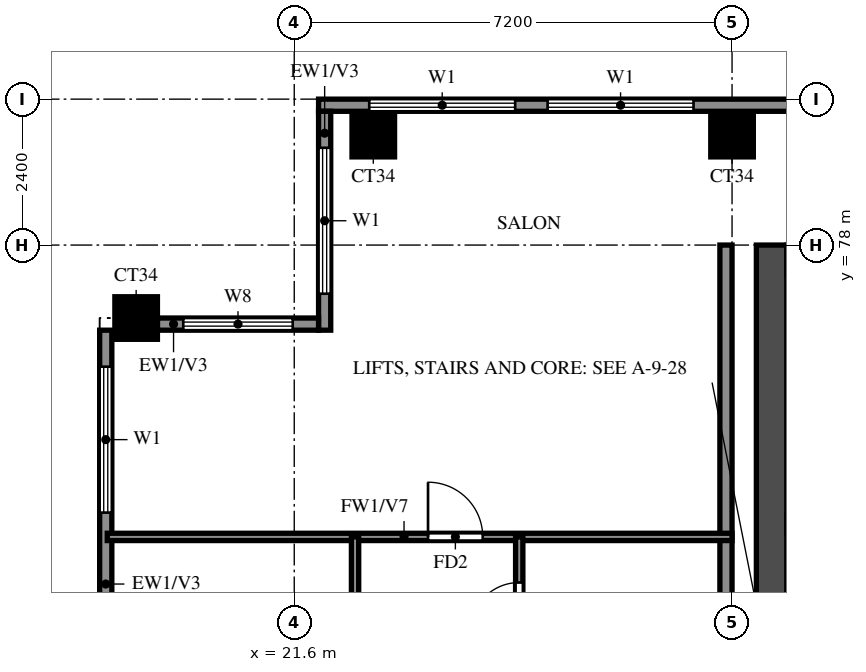
"""IFC4 building model, lengths in metres.
Left out: names, types, materials, properties, quantities, classifications, styles, units other than length and angle.
Written with IfcOpenShell. Run it as: python <this file> out.ifc"""

import sys

from ifc_helpers import new_model, si_unit, direction, frame, frame_2d, origin, origin_2d, place, context, subcontext, project, spatial, rectangle, extrude, source, transform, mapped, element, fill, save


model = new_model("IFC4")
c1 = context("Model", 3, precision=1e-05, world=origin(), true_north=direction((0.0, 1.0)))
c2 = subcontext(c1, "Body", "Model", "MODEL_VIEW")
j1 = project(units=[si_unit("LENGTHUNIT", "METRE"), si_unit("PLANEANGLEUNIT", "RADIAN")], contexts=[c1])
p1 = place(None, origin())
s1 = spatial("IfcSite", under=j1, at=p1, CompositionType="ELEMENT")
p2 = place(p1, origin())
s2 = spatial("IfcBuilding", under=s1, at=p2, CompositionType="ELEMENT")
p3 = place(p2, frame((0.0, 0.0, 215.0)))
s3 = spatial("IfcBuildingStorey", under=s2, at=p3, CompositionType="ELEMENT", Elevation=215.0)
m1 = source(origin(), c2, "Body", "SweptSolid", [
    extrude(rectangle(XDim=0.7, YDim=0.7, at=origin_2d()), origin(), (0.0, 0.0, 1.0), 3.22),
])
for number, where, z_axis, x_axis in (
    (1, (19.0, 76.8, 0.0), (0.0, 0.0, 1.0), (1.0, 0.0, 0.0)),
    (2, (22.9, 79.8, 0.0), (0.0, 0.0, 1.0), (1.0, 0.0, 0.0)),
    (3, (28.8, 79.8, 0.0), (0.0, 0.0, 1.0), (1.0, 0.0, 0.0)),
):
    element("IfcColumn", number, at=place(p3, frame(where, z_axis=z_axis, x_axis=x_axis)), inside=s3, PredefinedType="COLUMN", context=c2, shape_type="MappedRepresentation", body=[
        mapped(m1, transform((0.0, 0.0, 0.0))),
    ])
p4 = place(p3, frame((29.45, 66.15, 0.0), z_axis=(0.0, 0.0, 1.0), x_axis=(0.0, 1.0, 0.0)))
e4 = element("IfcWall", 4, at=p4, inside=s3, PredefinedType="SHEAR", context=c2, shape_type="SweptSolid", body=[
    extrude(rectangle(XDim=11.85, YDim=0.5, at=frame_2d((5.925, 0.0))), origin(), (0.0, 0.0, 1.0), 3.22),
])
p5 = place(p3, frame((78.6, 80.3, 0.0), z_axis=(0.0, 0.0, 1.0), x_axis=(-1.0, 0.0, 0.0)))
e5 = element("IfcWall", 5, at=p5, inside=s3, PredefinedType="SOLIDWALL", context=c2, shape_type="SweptSolid", body=[
    extrude(rectangle(XDim=56.6, YDim=0.2, at=frame_2d((28.3, 0.0))), origin(), (0.0, 0.0, 1.0), 3.22),
])
p6 = place(p5, frame((3.9, 0.0, 0.0)))
e6 = element("IfcOpeningElement", 6, at=p6, cuts=e5, PredefinedType="OPENING", context=c2, shape_type="SweptSolid", body=[
    extrude(rectangle(XDim=1.8, YDim=2.4, at=frame_2d((0.9, 1.2))), frame((0.0, 0.11, 0.0), z_axis=(0.0, -1.0, 0.0), x_axis=(1.0, 0.0, 0.0)), (0.0, 0.0, 1.0), 0.22),
])
p7 = place(p5, frame((50.433, 0.0, 0.6)))
e7 = element("IfcOpeningElement", 7, at=p7, cuts=e5, PredefinedType="OPENING", context=c2, shape_type="SweptSolid", body=[
    extrude(rectangle(XDim=2.4, YDim=2.4, at=frame_2d((1.2, 1.2))), frame((0.0, 0.11, 0.0), z_axis=(0.0, -1.0, 0.0), x_axis=(1.0, 0.0, 0.0)), (0.0, 0.0, 1.0), 0.22),
])
p8 = place(p5, frame((53.367, 0.0, 0.6)))
e8 = element("IfcOpeningElement", 8, at=p8, cuts=e5, PredefinedType="OPENING", context=c2, shape_type="SweptSolid", body=[
    extrude(rectangle(XDim=2.4, YDim=2.4, at=frame_2d((1.2, 1.2))), frame((0.0, 0.11, 0.0), z_axis=(0.0, -1.0, 0.0), x_axis=(1.0, 0.0, 0.0)), (0.0, 0.0, 1.0), 0.22),
])
p9 = place(p5, frame((0.4, 0.0, 0.6)))
e9 = element("IfcOpeningElement", 9, at=p9, cuts=e5, PredefinedType="OPENING", context=c2, shape_type="SweptSolid", body=[
    extrude(rectangle(XDim=1.2, YDim=2.4, at=frame_2d((0.6, 1.2))), frame((0.0, 0.11, 0.0), z_axis=(0.0, -1.0, 0.0), x_axis=(1.0, 0.0, 0.0)), (0.0, 0.0, 1.0), 0.22),
])
p10 = place(p5, frame((2.55, 0.0, 0.6)))
e10 = element("IfcOpeningElement", 10, at=p10, cuts=e5, PredefinedType="OPENING", context=c2, shape_type="SweptSolid", body=[
    extrude(rectangle(XDim=0.9, YDim=2.4, at=frame_2d((0.45, 1.2))), frame((0.0, 0.11, 0.0), z_axis=(0.0, -1.0, 0.0), x_axis=(1.0, 0.0, 0.0)), (0.0, 0.0, 1.0), 0.22),
])
p11 = place(p3, frame((22.1, 80.2, 0.0), z_axis=(0.0, 0.0, 1.0), x_axis=(0.0, -1.0, 0.0)))
e11 = element("IfcWall", 11, at=p11, inside=s3, PredefinedType="SOLIDWALL", context=c2, shape_type="SweptSolid", body=[
    extrude(rectangle(XDim=3.6, YDim=0.2, at=frame_2d((1.8, 0.0))), origin(), (0.0, 0.0, 1.0), 3.22),
])
p12 = place(p11, frame((0.6, 0.0, 0.6)))
e12 = element("IfcOpeningElement", 12, at=p12, cuts=e11, PredefinedType="OPENING", context=c2, shape_type="SweptSolid", body=[
    extrude(rectangle(XDim=2.4, YDim=2.4, at=frame_2d((1.2, 1.2))), frame((0.0, 0.11, 0.0), z_axis=(0.0, -1.0, 0.0), x_axis=(1.0, 0.0, 0.0)), (0.0, 0.0, 1.0), 0.22),
])
p13 = place(p3, frame((22.0, 76.7, 0.0), z_axis=(0.0, 0.0, 1.0), x_axis=(-1.0, 0.0, 0.0)))
e13 = element("IfcWall", 13, at=p13, inside=s3, PredefinedType="SOLIDWALL", context=c2, shape_type="SweptSolid", body=[
    extrude(rectangle(XDim=2.65, YDim=0.2, at=frame_2d((1.325, 0.0))), origin(), (0.0, 0.0, 1.0), 3.22),
])
p14 = place(p13, frame((0.425, 0.0, 0.6)))
e14 = element("IfcOpeningElement", 14, at=p14, cuts=e13, PredefinedType="OPENING", context=c2, shape_type="SweptSolid", body=[
    extrude(rectangle(XDim=1.8, YDim=2.4, at=frame_2d((0.9, 1.2))), frame((0.0, 0.11, 0.0), z_axis=(0.0, -1.0, 0.0), x_axis=(1.0, 0.0, 0.0)), (0.0, 0.0, 1.0), 0.22),
])
p15 = place(p3, frame((18.5, 76.6, 0.0), z_axis=(0.0, 0.0, 1.0), x_axis=(0.0, -1.0, 0.0)))
e15 = element("IfcWall", 15, at=p15, inside=s3, PredefinedType="SOLIDWALL", context=c2, shape_type="SweptSolid", body=[
    extrude(rectangle(XDim=33.4, YDim=0.2, at=frame_2d((16.7, 0.0))), origin(), (0.0, 0.0, 1.0), 3.22),
])
p16 = place(p15, frame((29.7, 0.0, 0.6)))
e16 = element("IfcOpeningElement", 16, at=p16, cuts=e15, PredefinedType="OPENING", context=c2, shape_type="SweptSolid", body=[
    extrude(rectangle(XDim=2.4, YDim=2.4, at=frame_2d((1.2, 1.2))), frame((0.0, 0.11, 0.0), z_axis=(0.0, -1.0, 0.0), x_axis=(1.0, 0.0, 0.0)), (0.0, 0.0, 1.0), 0.22),
])
p17 = place(p15, frame((25.6, 0.0, 0.6)))
e17 = element("IfcOpeningElement", 17, at=p17, cuts=e15, PredefinedType="OPENING", context=c2, shape_type="SweptSolid", body=[
    extrude(rectangle(XDim=2.4, YDim=2.4, at=frame_2d((1.2, 1.2))), frame((0.0, 0.11, 0.0), z_axis=(0.0, -1.0, 0.0), x_axis=(1.0, 0.0, 0.0)), (0.0, 0.0, 1.0), 0.22),
])
p18 = place(p15, frame((22.0, 0.0, 0.6)))
e18 = element("IfcOpeningElement", 18, at=p18, cuts=e15, PredefinedType="OPENING", context=c2, shape_type="SweptSolid", body=[
    extrude(rectangle(XDim=2.4, YDim=2.4, at=frame_2d((1.2, 1.2))), frame((0.0, 0.11, 0.0), z_axis=(0.0, -1.0, 0.0), x_axis=(1.0, 0.0, 0.0)), (0.0, 0.0, 1.0), 0.22),
])
p19 = place(p15, frame((18.4, 0.0, 0.6)))
e19 = element("IfcOpeningElement", 19, at=p19, cuts=e15, PredefinedType="OPENING", context=c2, shape_type="SweptSolid", body=[
    extrude(rectangle(XDim=2.4, YDim=2.4, at=frame_2d((1.2, 1.2))), frame((0.0, 0.11, 0.0), z_axis=(0.0, -1.0, 0.0), x_axis=(1.0, 0.0, 0.0)), (0.0, 0.0, 1.0), 0.22),
])
p20 = place(p15, frame((14.8, 0.0, 0.6)))
e20 = element("IfcOpeningElement", 20, at=p20, cuts=e15, PredefinedType="OPENING", context=c2, shape_type="SweptSolid", body=[
    extrude(rectangle(XDim=2.4, YDim=2.4, at=frame_2d((1.2, 1.2))), frame((0.0, 0.11, 0.0), z_axis=(0.0, -1.0, 0.0), x_axis=(1.0, 0.0, 0.0)), (0.0, 0.0, 1.0), 0.22),
])
p21 = place(p15, frame((7.833, 0.0, 0.6)))
e21 = element("IfcOpeningElement", 21, at=p21, cuts=e15, PredefinedType="OPENING", context=c2, shape_type="SweptSolid", body=[
    extrude(rectangle(XDim=2.4, YDim=2.4, at=frame_2d((1.2, 1.2))), frame((0.0, 0.11, 0.0), z_axis=(0.0, -1.0, 0.0), x_axis=(1.0, 0.0, 0.0)), (0.0, 0.0, 1.0), 0.22),
])
p22 = place(p15, frame((10.967, 0.0, 0.6)))
e22 = element("IfcOpeningElement", 22, at=p22, cuts=e15, PredefinedType="OPENING", context=c2, shape_type="SweptSolid", body=[
    extrude(rectangle(XDim=2.4, YDim=2.4, at=frame_2d((1.2, 1.2))), frame((0.0, 0.11, 0.0), z_axis=(0.0, -1.0, 0.0), x_axis=(1.0, 0.0, 0.0)), (0.0, 0.0, 1.0), 0.22),
])
p23 = place(p15, frame((4.75, 0.0, 1.5)))
e23 = element("IfcOpeningElement", 23, at=p23, cuts=e15, PredefinedType="OPENING", context=c2, shape_type="SweptSolid", body=[
    extrude(rectangle(XDim=0.9, YDim=0.9, at=frame_2d((0.45, 0.45))), frame((0.0, 0.11, 0.0), z_axis=(0.0, -1.0, 0.0), x_axis=(1.0, 0.0, 0.0)), (0.0, 0.0, 1.0), 0.22),
])
p24 = place(p15, frame((0.6, 0.0, 0.6)))
e24 = element("IfcOpeningElement", 24, at=p24, cuts=e15, PredefinedType="OPENING", context=c2, shape_type="SweptSolid", body=[
    extrude(rectangle(XDim=2.4, YDim=2.4, at=frame_2d((1.2, 1.2))), frame((0.0, 0.11, 0.0), z_axis=(0.0, -1.0, 0.0), x_axis=(1.0, 0.0, 0.0)), (0.0, 0.0, 1.0), 0.22),
])
p25 = place(p3, frame((28.7, 62.4, 0.0), z_axis=(0.0, 0.0, 1.0), x_axis=(0.0, 1.0, 0.0)))
e25 = element("IfcWall", 25, at=p25, inside=s3, PredefinedType="SOLIDWALL", context=c2, shape_type="SweptSolid", body=[
    extrude(rectangle(XDim=15.6, YDim=0.2, at=frame_2d((7.8, 0.0))), origin(), (0.0, 0.0, 1.0), 3.22),
])
p26 = place(p3, frame((18.525, 73.2, 0.0), z_axis=(0.0, 0.0, 1.0), x_axis=(1.0, 0.0, 0.0)))
e26 = element("IfcWall", 26, at=p26, inside=s3, PredefinedType="PARTITIONING", context=c2, shape_type="SweptSolid", body=[
    extrude(rectangle(XDim=10.275, YDim=0.12, at=frame_2d((5.138, 0.0))), origin(), (0.0, 0.0, 1.0), 2.32),
])
p27 = place(p26, frame((5.275, 0.0, 0.0)))
e27 = element("IfcOpeningElement", 27, at=p27, cuts=e26, PredefinedType="OPENING", context=c2, shape_type="SweptSolid", body=[
    extrude(rectangle(XDim=0.9, YDim=2.1, at=frame_2d((0.45, 1.05))), frame((0.0, 0.07, 0.0), z_axis=(0.0, -1.0, 0.0), x_axis=(1.0, 0.0, 0.0)), (0.0, 0.0, 1.0), 0.14),
])
p28 = place(p3, frame((22.6, 69.6, 0.0), z_axis=(0.0, 0.0, 1.0), x_axis=(0.0, 1.0, 0.0)))
e28 = element("IfcWall", 28, at=p28, inside=s3, PredefinedType="PARTITIONING", context=c2, shape_type="SweptSolid", body=[
    extrude(rectangle(XDim=3.6, YDim=0.12, at=frame_2d((1.8, 0.0))), origin(), (0.0, 0.0, 1.0), 3.22),
])
p29 = place(p3, frame((25.3, 61.2, 0.0), z_axis=(0.0, 0.0, 1.0), x_axis=(0.0, 1.0, 0.0)))
e29 = element("IfcWall", 29, at=p29, inside=s3, PredefinedType="PARTITIONING", context=c2, shape_type="SweptSolid", body=[
    extrude(rectangle(XDim=12.0, YDim=0.12, at=frame_2d((6.0, 0.0))), origin(), (0.0, 0.0, 1.0), 3.22),
])
p30 = place(p29, frame((4.2, 0.0, 0.0)))
e30 = element("IfcOpeningElement", 30, at=p30, cuts=e29, PredefinedType="OPENING", context=c2, shape_type="SweptSolid", body=[
    extrude(rectangle(XDim=0.9, YDim=2.1, at=frame_2d((0.45, 1.05))), frame((0.0, 0.07, 0.0), z_axis=(0.0, -1.0, 0.0), x_axis=(1.0, 0.0, 0.0)), (0.0, 0.0, 1.0), 0.14),
])
p31 = place(p29, frame((7.975, 0.0, 0.0)))
e31 = element("IfcOpeningElement", 31, at=p31, cuts=e29, PredefinedType="OPENING", context=c2, shape_type="SweptSolid", body=[
    extrude(rectangle(XDim=0.8, YDim=2.1, at=frame_2d((0.4, 1.05))), frame((0.0, 0.07, 0.0), z_axis=(0.0, -1.0, 0.0), x_axis=(1.0, 0.0, 0.0)), (0.0, 0.0, 1.0), 0.14),
])
p32 = place(p29, frame((10.45, 0.0, 0.0)))
e32 = element("IfcOpeningElement", 32, at=p32, cuts=e29, PredefinedType="OPENING", context=c2, shape_type="SweptSolid", body=[
    extrude(rectangle(XDim=0.8, YDim=2.1, at=frame_2d((0.4, 1.05))), frame((0.0, 0.07, 0.0), z_axis=(0.0, -1.0, 0.0), x_axis=(1.0, 0.0, 0.0)), (0.0, 0.0, 1.0), 0.14),
])
p33 = place(p7, origin())
e33 = element("IfcWindow", 33, at=p33, inside=s3, PartitioningType="DOUBLE_PANEL_VERTICAL", PredefinedType="WINDOW", context=c2, shape_type="SweptSolid", body=[
    extrude(rectangle(XDim=2.4, YDim=2.4, at=frame_2d((1.2, 1.2))), frame((0.0, 0.03, 0.0), z_axis=(0.0, -1.0, 0.0), x_axis=(1.0, 0.0, 0.0)), (0.0, 0.0, 1.0), 0.06),
])
fill(e7, e33)
p34 = place(p8, origin())
e34 = element("IfcWindow", 34, at=p34, inside=s3, PartitioningType="DOUBLE_PANEL_VERTICAL", PredefinedType="WINDOW", context=c2, shape_type="SweptSolid", body=[
    extrude(rectangle(XDim=2.4, YDim=2.4, at=frame_2d((1.2, 1.2))), frame((0.0, 0.03, 0.0), z_axis=(0.0, -1.0, 0.0), x_axis=(1.0, 0.0, 0.0)), (0.0, 0.0, 1.0), 0.06),
])
fill(e8, e34)
p35 = place(p12, origin())
e35 = element("IfcWindow", 35, at=p35, inside=s3, PartitioningType="DOUBLE_PANEL_VERTICAL", PredefinedType="WINDOW", context=c2, shape_type="SweptSolid", body=[
    extrude(rectangle(XDim=2.4, YDim=2.4, at=frame_2d((1.2, 1.2))), frame((0.0, 0.03, 0.0), z_axis=(0.0, -1.0, 0.0), x_axis=(1.0, 0.0, 0.0)), (0.0, 0.0, 1.0), 0.06),
])
fill(e12, e35)
p36 = place(p14, origin())
e36 = element("IfcWindow", 36, at=p36, inside=s3, PartitioningType="DOUBLE_PANEL_VERTICAL", PredefinedType="WINDOW", context=c2, shape_type="SweptSolid", body=[
    extrude(rectangle(XDim=1.8, YDim=2.4, at=frame_2d((0.9, 1.2))), frame((0.0, 0.03, 0.0), z_axis=(0.0, -1.0, 0.0), x_axis=(1.0, 0.0, 0.0)), (0.0, 0.0, 1.0), 0.06),
])
fill(e14, e36)
p37 = place(p24, origin())
e37 = element("IfcWindow", 37, at=p37, inside=s3, PartitioningType="DOUBLE_PANEL_VERTICAL", PredefinedType="WINDOW", context=c2, shape_type="SweptSolid", body=[
    extrude(rectangle(XDim=2.4, YDim=2.4, at=frame_2d((1.2, 1.2))), frame((0.0, 0.03, 0.0), z_axis=(0.0, -1.0, 0.0), x_axis=(1.0, 0.0, 0.0)), (0.0, 0.0, 1.0), 0.06),
])
fill(e24, e37)
p38 = place(p27, origin())
e38 = element("IfcDoor", 38, at=p38, inside=s3, OperationType="SINGLE_SWING_RIGHT", PredefinedType="DOOR", context=c2, shape_type="SweptSolid", body=[
    extrude(rectangle(XDim=0.9, YDim=2.1, at=frame_2d((0.45, 1.05))), frame((0.0, 0.025, 0.0), z_axis=(0.0, -1.0, 0.0), x_axis=(1.0, 0.0, 0.0)), (0.0, 0.0, 1.0), 0.05),
])
fill(e27, e38)
p39 = place(p32, origin())
e39 = element("IfcDoor", 39, at=p39, inside=s3, OperationType="SINGLE_SWING_LEFT", PredefinedType="DOOR", context=c2, shape_type="SweptSolid", body=[
    extrude(rectangle(XDim=0.8, YDim=2.1, at=frame_2d((0.4, 1.05))), frame((0.0, 0.025, 0.0), z_axis=(0.0, -1.0, 0.0), x_axis=(1.0, 0.0, 0.0)), (0.0, 0.0, 1.0), 0.05),
])
fill(e32, e39)
save(model, sys.argv[1])
